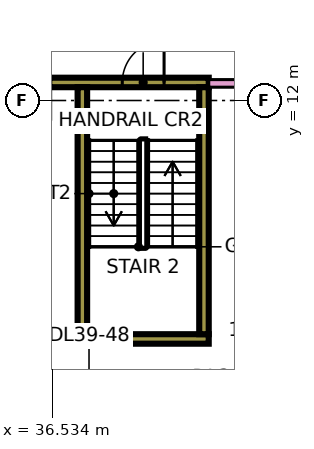
"""IFC4 building model, lengths in metres.
Left out: names, types, materials, properties, quantities, classifications, styles, units other than length and angle.
Written with IfcOpenShell. Run it as: python <this file> out.ifc"""

import sys

from ifc_helpers import new_model, si_unit, direction, frame, frame_2d, origin, place, context, subcontext, project, spatial, rectangle, extrude, element, fill, save


model = new_model("IFC4")
c1 = context("Model", 3, precision=1e-05, world=origin(), true_north=direction((0.0, 1.0)))
c2 = subcontext(c1, "Body", "Model", "MODEL_VIEW")
j1 = project(units=[si_unit("LENGTHUNIT", "METRE"), si_unit("PLANEANGLEUNIT", "RADIAN")], contexts=[c1])
p1 = place(None, origin())
s1 = spatial("IfcSite", under=j1, at=p1, CompositionType="ELEMENT")
p2 = place(p1, origin())
s2 = spatial("IfcBuilding", under=s1, at=p2, CompositionType="ELEMENT")
p3 = place(p2, frame((0.0, 0.0, 172.4)))
s3 = spatial("IfcBuildingStorey", under=s2, at=p3, CompositionType="ELEMENT", Elevation=172.4)
p4 = place(p3, frame((37.2, 5.725, 0.0), z_axis=(0.0, 0.0, 1.0), x_axis=(1.0, 0.0, 0.0)))
e1 = element("IfcWall", 1, at=p4, inside=s3, PredefinedType="SHEAR", context=c2, shape_type="SweptSolid", body=[
    extrude(rectangle(XDim=3.45, YDim=0.25, at=frame_2d((1.725, 0.0))), origin(), (0.0, 0.0, 1.0), 3.75),
])
p5 = place(p3, frame((36.45, 12.475, 0.0), z_axis=(0.0, 0.0, 1.0), x_axis=(1.0, 0.0, 0.0)))
e2 = element("IfcWall", 2, at=p5, inside=s3, PredefinedType="SHEAR", context=c2, shape_type="SweptSolid", body=[
    extrude(rectangle(XDim=4.2, YDim=0.25, at=frame_2d((2.1, 0.0))), origin(), (0.0, 0.0, 1.0), 3.75),
])
p6 = place(p5, frame((1.925, 0.0, 0.0)))
e3 = element("IfcOpeningElement", 3, at=p6, cuts=e2, PredefinedType="OPENING", context=c2, shape_type="SweptSolid", body=[
    extrude(rectangle(XDim=1.1, YDim=2.2, at=frame_2d((0.55, 1.1))), frame((0.0, 0.135, 0.0), z_axis=(0.0, -1.0, 0.0), x_axis=(1.0, 0.0, 0.0)), (0.0, 0.0, 1.0), 0.27),
])
for number, where, z_axis, x_axis in (
    (4, (37.325, 5.85, 0.0), (0.0, 0.0, 1.0), (0.0, 1.0, 0.0)),
    (5, (40.525, 5.85, 0.0), (0.0, 0.0, 1.0), (0.0, 1.0, 0.0)),
):
    element("IfcWall", number, at=place(p3, frame(where, z_axis=z_axis, x_axis=x_axis)), inside=s3, PredefinedType="SHEAR", context=c2, shape_type="SweptSolid", body=[
        extrude(rectangle(XDim=6.5, YDim=0.25, at=frame_2d((3.25, 0.0))), origin(), (0.0, 0.0, 1.0), 3.75),
    ])
p7 = place(p3, frame((40.65, 12.45, 0.0), z_axis=(0.0, 0.0, 1.0), x_axis=(1.0, 0.0, 0.0)))
e6 = element("IfcWall", 6, at=p7, inside=s3, PredefinedType="PARTITIONING", context=c2, shape_type="SweptSolid", body=[
    extrude(rectangle(XDim=22.35, YDim=0.2, at=frame_2d((11.175, 0.0))), origin(), (0.0, 0.0, 1.0), 3.35),
])
p8 = place(p7, frame((8.25, 0.0, 0.0)))
e7 = element("IfcOpeningElement", 7, at=p8, cuts=e6, PredefinedType="OPENING", context=c2, shape_type="SweptSolid", body=[
    extrude(rectangle(XDim=1.0, YDim=2.1, at=frame_2d((0.5, 1.05))), frame((0.0, 0.11, 0.0), z_axis=(0.0, -1.0, 0.0), x_axis=(1.0, 0.0, 0.0)), (0.0, 0.0, 1.0), 0.22),
])
p9 = place(p7, frame((1.05, 0.0, 0.0)))
e8 = element("IfcOpeningElement", 8, at=p9, cuts=e6, PredefinedType="OPENING", context=c2, shape_type="SweptSolid", body=[
    extrude(rectangle(XDim=1.0, YDim=2.1, at=frame_2d((0.5, 1.05))), frame((0.0, 0.11, 0.0), z_axis=(0.0, -1.0, 0.0), x_axis=(1.0, 0.0, 0.0)), (0.0, 0.0, 1.0), 0.22),
])
p10 = place(p6, frame((1.1, 0.0, 0.0), z_axis=(0.0, 0.0, 1.0), x_axis=(-1.0, 0.0, 0.0)))
e9 = element("IfcDoor", 9, at=p10, inside=s3, OperationType="SINGLE_SWING_RIGHT", PredefinedType="DOOR", context=c2, shape_type="SweptSolid", body=[
    extrude(rectangle(XDim=1.1, YDim=2.2, at=frame_2d((0.55, 1.1))), frame((0.0, 0.025, 0.0), z_axis=(0.0, -1.0, 0.0), x_axis=(1.0, 0.0, 0.0)), (0.0, 0.0, 1.0), 0.05),
])
fill(e3, e9)
save(model, sys.argv[1])
